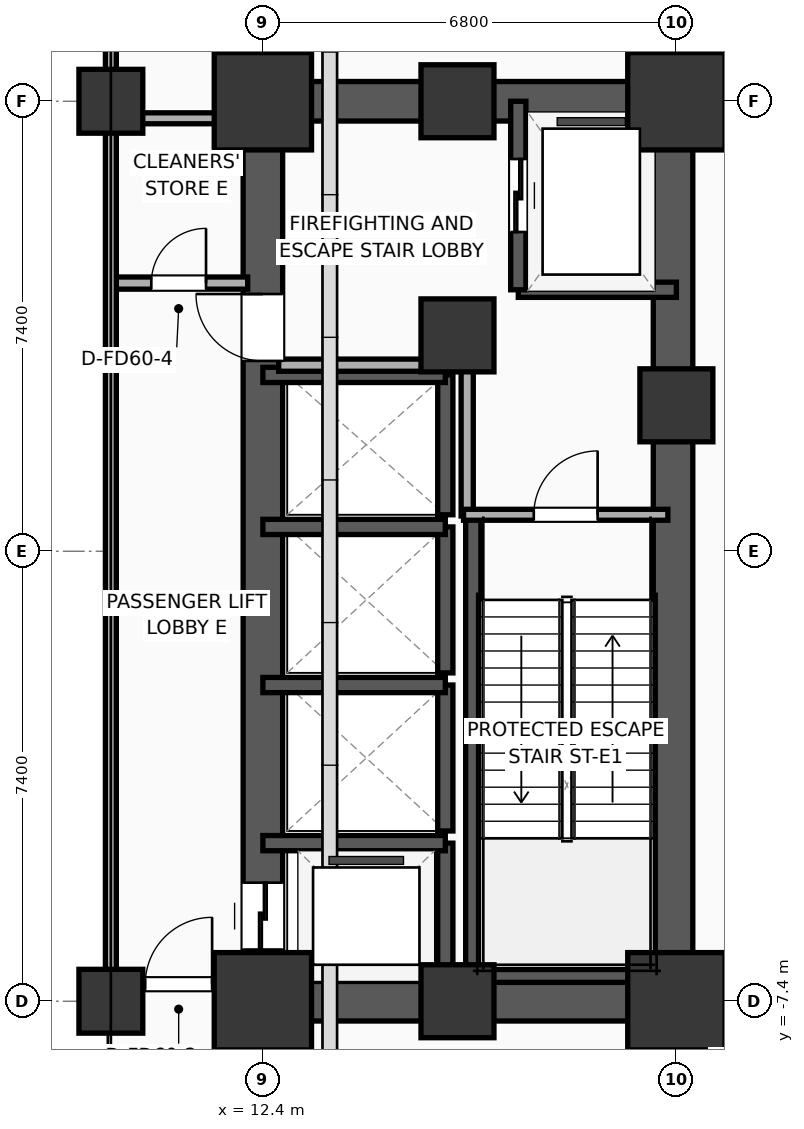
"""IFC4 building model, lengths in metres.
Left out: names, types, materials, properties, quantities, classifications, styles, units other than length and angle.
Written with IfcOpenShell. Run it as: python <this file> out.ifc"""

import sys

from ifc_helpers import new_model, si_unit, direction, frame, frame_2d, origin, origin_2d, place, context, subcontext, project, spatial, rectangle, extrude, element, fill, save


model = new_model("IFC4")
c1 = context("Model", 3, precision=1e-05, world=origin(), true_north=direction((0.0, 1.0)))
c2 = subcontext(c1, "Body", "Model", "MODEL_VIEW")
j1 = project(units=[si_unit("LENGTHUNIT", "METRE"), si_unit("PLANEANGLEUNIT", "RADIAN")], contexts=[c1])
p1 = place(None, origin())
s1 = spatial("IfcSite", under=j1, at=p1, CompositionType="ELEMENT")
p2 = place(p1, origin())
s2 = spatial("IfcBuilding", under=s1, at=p2, CompositionType="ELEMENT")
p3 = place(p2, frame((0.0, 0.0, 10.4)))
s3 = spatial("IfcBuildingStorey", under=s2, at=p3, CompositionType="ELEMENT", Elevation=10.4)
p4 = place(p3, frame((12.4, -7.4, 0.0), z_axis=(0.0, 0.0, 1.0), x_axis=(1.0, 0.0, 0.0)))
e1 = element("IfcColumn", 1, at=p4, inside=s3, PredefinedType="COLUMN", context=c2, shape_type="SweptSolid", body=[
    extrude(rectangle(XDim=1.6, YDim=1.6, at=origin_2d()), origin(), (0.0, 0.0, 1.0), 5.2),
])
p5 = place(p3, frame((15.6, 3.55, 0.0), z_axis=(0.0, 0.0, 1.0), x_axis=(1.0, 0.0, 0.0)))
e2 = element("IfcColumn", 2, at=p5, inside=s3, PredefinedType="COLUMN", context=c2, shape_type="SweptSolid", body=[
    extrude(rectangle(XDim=1.2, YDim=1.2, at=origin_2d()), origin(), (0.0, 0.0, 1.0), 5.2),
])
p6 = place(p3, frame((12.4, 7.4, 0.0), z_axis=(0.0, 0.0, 1.0), x_axis=(1.0, 0.0, 0.0)))
e3 = element("IfcColumn", 3, at=p6, inside=s3, PredefinedType="COLUMN", context=c2, shape_type="SweptSolid", body=[
    extrude(rectangle(XDim=1.6, YDim=1.6, at=origin_2d()), origin(), (0.0, 0.0, 1.0), 5.2),
])
for number, where, z_axis, x_axis in (
    (4, (15.6, -7.4, 0.0), (0.0, 0.0, 1.0), (1.0, 0.0, 0.0)),
    (5, (15.6, 7.4, 0.0), (0.0, 0.0, 1.0), (1.0, 0.0, 0.0)),
):
    element("IfcColumn", number, at=place(p3, frame(where, z_axis=z_axis, x_axis=x_axis)), inside=s3, PredefinedType="COLUMN", context=c2, shape_type="SweptSolid", body=[
        extrude(rectangle(XDim=1.2, YDim=1.2, at=origin_2d()), origin(), (0.0, 0.0, 1.0), 5.2),
    ])
p7 = place(p3, frame((19.2, -7.4, 0.0), z_axis=(0.0, 0.0, 1.0), x_axis=(1.0, 0.0, 0.0)))
e6 = element("IfcColumn", 6, at=p7, inside=s3, PredefinedType="COLUMN", context=c2, shape_type="SweptSolid", body=[
    extrude(rectangle(XDim=1.6, YDim=1.6, at=origin_2d()), origin(), (0.0, 0.0, 1.0), 5.2),
])
p8 = place(p3, frame((19.2, 2.4, 0.0), z_axis=(0.0, 0.0, 1.0), x_axis=(1.0, 0.0, 0.0)))
e7 = element("IfcColumn", 7, at=p8, inside=s3, PredefinedType="COLUMN", context=c2, shape_type="SweptSolid", body=[
    extrude(rectangle(XDim=1.2, YDim=1.2, at=origin_2d()), origin(), (0.0, 0.0, 1.0), 5.2),
])
p9 = place(p3, frame((19.2, 7.4, 0.0), z_axis=(0.0, 0.0, 1.0), x_axis=(1.0, 0.0, 0.0)))
e8 = element("IfcColumn", 8, at=p9, inside=s3, PredefinedType="COLUMN", context=c2, shape_type="SweptSolid", body=[
    extrude(rectangle(XDim=1.6, YDim=1.6, at=origin_2d()), origin(), (0.0, 0.0, 1.0), 5.2),
])
for number, where, z_axis, x_axis in (
    (9, (12.075, -7.4, 0.0), (0.0, 0.0, 1.0), (1.0, 0.0, 0.0)),
    (10, (12.075, 7.4, 0.0), (0.0, 0.0, 1.0), (1.0, 0.0, 0.0)),
):
    element("IfcWall", number, at=place(p3, frame(where, z_axis=z_axis, x_axis=x_axis)), inside=s3, PredefinedType="SHEAR", context=c2, shape_type="SweptSolid", body=[
        extrude(rectangle(XDim=7.45, YDim=0.65, at=frame_2d((3.725, 0.0))), origin(), (0.0, 0.0, 1.0), 4.92),
    ])
p10 = place(p3, frame((12.4, -7.4, 0.0), z_axis=(0.0, 0.0, 1.0), x_axis=(0.0, 1.0, 0.0)))
e11 = element("IfcWall", 11, at=p10, inside=s3, PredefinedType="SHEAR", context=c2, shape_type="SweptSolid", body=[
    extrude(rectangle(XDim=14.8, YDim=0.65, at=frame_2d((7.4, 0.0))), origin(), (0.0, 0.0, 1.0), 4.92),
])
p11 = place(p10, frame((0.85, 0.0, 0.0)))
e12 = element("IfcOpeningElement", 12, at=p11, cuts=e11, PredefinedType="OPENING", context=c2, shape_type="SweptSolid", body=[
    extrude(rectangle(XDim=1.1, YDim=2.05, at=frame_2d((0.55, 1.025))), frame((0.0, 0.335, 0.0), z_axis=(0.0, -1.0, 0.0), x_axis=(1.0, 0.0, 0.0)), (0.0, 0.0, 1.0), 0.67),
])
p12 = place(p10, frame((10.53, 0.0, 0.0)))
e13 = element("IfcOpeningElement", 13, at=p12, cuts=e11, PredefinedType="OPENING", context=c2, shape_type="SweptSolid", body=[
    extrude(rectangle(XDim=1.1, YDim=2.05, at=frame_2d((0.55, 1.025))), frame((0.0, 0.335, 0.0), z_axis=(0.0, -1.0, 0.0), x_axis=(1.0, 0.0, 0.0)), (0.0, 0.0, 1.0), 0.67),
])
p13 = place(p3, frame((19.145, -7.4, 0.0), z_axis=(0.0, 0.0, 1.0), x_axis=(0.0, 1.0, 0.0)))
e14 = element("IfcWall", 14, at=p13, inside=s3, PredefinedType="SHEAR", context=c2, shape_type="SweptSolid", body=[
    extrude(rectangle(XDim=14.8, YDim=0.65, at=frame_2d((7.4, 0.0))), origin(), (0.0, 0.0, 1.0), 4.92),
])
p14 = place(p3, frame((15.86, -7.085, 0.0), z_axis=(0.0, 0.0, 1.0), x_axis=(0.0, 1.0, 0.0)))
e15 = element("IfcWall", 15, at=p14, inside=s3, PredefinedType="SOLIDWALL", context=c2, shape_type="SweptSolid", body=[
    extrude(rectangle(XDim=7.685, YDim=0.25, at=frame_2d((3.843, 0.0))), origin(), (0.0, 0.0, 1.0), 4.92),
])
p15 = place(p3, frame((15.74, -6.965, 0.0), z_axis=(0.0, 0.0, 1.0), x_axis=(1.0, 0.0, 0.0)))
e16 = element("IfcWall", 16, at=p15, inside=s3, PredefinedType="SOLIDWALL", context=c2, shape_type="SweptSolid", body=[
    extrude(rectangle(XDim=3.46, YDim=0.25, at=frame_2d((1.73, 0.0))), origin(), (0.0, 0.0, 1.0), 4.92),
])
for number, where, z_axis, x_axis in (
    (17, (9.9, -7.4, 0.0), (0.0, 0.0, 1.0), (1.0, 0.0, 0.0)),
    (18, (9.9, 7.4, 0.0), (0.0, 0.0, 1.0), (1.0, 0.0, 0.0)),
):
    element("IfcColumn", number, at=place(p3, frame(where, z_axis=z_axis, x_axis=x_axis)), inside=s3, PredefinedType="COLUMN", context=c2, shape_type="SweptSolid", body=[
        extrude(rectangle(XDim=1.05, YDim=1.05, at=origin_2d()), origin(), (0.0, 0.0, 1.0), 5.2),
    ])
p16 = place(p3, frame((16.6, 4.3, 0.0), z_axis=(0.0, 0.0, 1.0), x_axis=(1.0, 0.0, 0.0)))
e19 = element("IfcWall", 19, at=p16, inside=s3, PredefinedType="SOLIDWALL", context=c2, shape_type="SweptSolid", body=[
    extrude(rectangle(XDim=2.6, YDim=0.25, at=frame_2d((1.3, 0.0))), origin(), (0.0, 0.0, 1.0), 4.92),
])
p17 = place(p3, frame((16.6, 7.4, 0.0), z_axis=(0.0, 0.0, 1.0), x_axis=(0.0, -1.0, 0.0)))
e20 = element("IfcWall", 20, at=p17, inside=s3, PredefinedType="SOLIDWALL", context=c2, shape_type="SweptSolid", body=[
    extrude(rectangle(XDim=3.1, YDim=0.25, at=frame_2d((1.55, 0.0))), origin(), (0.0, 0.0, 1.0), 4.92),
])
p18 = place(p17, frame((0.95, 0.0, 0.0)))
e21 = element("IfcOpeningElement", 21, at=p18, cuts=e20, PredefinedType="OPENING", context=c2, shape_type="SweptSolid", body=[
    extrude(rectangle(XDim=1.2, YDim=2.05, at=frame_2d((0.6, 1.025))), frame((0.0, 0.135, 0.0), z_axis=(0.0, -1.0, 0.0), x_axis=(1.0, 0.0, 0.0)), (0.0, 0.0, 1.0), 0.27),
])
p19 = place(p3, frame((15.4, -7.4, 0.0), z_axis=(0.0, 0.0, 1.0), x_axis=(0.0, 1.0, 0.0)))
e22 = element("IfcWall", 22, at=p19, inside=s3, PredefinedType="SOLIDWALL", context=c2, shape_type="SweptSolid", body=[
    extrude(rectangle(XDim=2.6, YDim=0.25, at=frame_2d((1.3, 0.0))), origin(), (0.0, 0.0, 1.0), 4.92),
])
p20 = place(p3, frame((15.4, -4.8, 0.0), z_axis=(0.0, 0.0, 1.0), x_axis=(-1.0, 0.0, 0.0)))
e23 = element("IfcWall", 23, at=p20, inside=s3, PredefinedType="SOLIDWALL", context=c2, shape_type="SweptSolid", body=[
    extrude(rectangle(XDim=3.0, YDim=0.25, at=frame_2d((1.5, 0.0))), origin(), (0.0, 0.0, 1.0), 4.92),
])
p21 = place(p3, frame((15.4, -4.6, 0.0), z_axis=(0.0, 0.0, 1.0), x_axis=(0.0, 1.0, 0.0)))
e24 = element("IfcWall", 24, at=p21, inside=s3, PredefinedType="SOLIDWALL", context=c2, shape_type="SweptSolid", body=[
    extrude(rectangle(XDim=2.4, YDim=0.25, at=frame_2d((1.2, 0.0))), origin(), (0.0, 0.0, 1.0), 4.92),
])
p22 = place(p3, frame((15.4, -2.2, 0.0), z_axis=(0.0, 0.0, 1.0), x_axis=(-1.0, 0.0, 0.0)))
e25 = element("IfcWall", 25, at=p22, inside=s3, PredefinedType="SOLIDWALL", context=c2, shape_type="SweptSolid", body=[
    extrude(rectangle(XDim=3.0, YDim=0.25, at=frame_2d((1.5, 0.0))), origin(), (0.0, 0.0, 1.0), 4.92),
])
p23 = place(p3, frame((15.4, -2.0, 0.0), z_axis=(0.0, 0.0, 1.0), x_axis=(0.0, 1.0, 0.0)))
e26 = element("IfcWall", 26, at=p23, inside=s3, PredefinedType="SOLIDWALL", context=c2, shape_type="SweptSolid", body=[
    extrude(rectangle(XDim=2.4, YDim=0.25, at=frame_2d((1.2, 0.0))), origin(), (0.0, 0.0, 1.0), 4.92),
])
p24 = place(p3, frame((15.4, 0.4, 0.0), z_axis=(0.0, 0.0, 1.0), x_axis=(-1.0, 0.0, 0.0)))
e27 = element("IfcWall", 27, at=p24, inside=s3, PredefinedType="SOLIDWALL", context=c2, shape_type="SweptSolid", body=[
    extrude(rectangle(XDim=3.0, YDim=0.25, at=frame_2d((1.5, 0.0))), origin(), (0.0, 0.0, 1.0), 4.92),
])
p25 = place(p3, frame((15.4, 0.6, 0.0), z_axis=(0.0, 0.0, 1.0), x_axis=(0.0, 1.0, 0.0)))
e28 = element("IfcWall", 28, at=p25, inside=s3, PredefinedType="SOLIDWALL", context=c2, shape_type="SweptSolid", body=[
    extrude(rectangle(XDim=2.3, YDim=0.25, at=frame_2d((1.15, 0.0))), origin(), (0.0, 0.0, 1.0), 4.92),
])
p26 = place(p3, frame((15.4, 2.9, 0.0), z_axis=(0.0, 0.0, 1.0), x_axis=(-1.0, 0.0, 0.0)))
e29 = element("IfcWall", 29, at=p26, inside=s3, PredefinedType="SOLIDWALL", context=c2, shape_type="SweptSolid", body=[
    extrude(rectangle(XDim=3.0, YDim=0.25, at=frame_2d((1.5, 0.0))), origin(), (0.0, 0.0, 1.0), 4.92),
])
p27 = place(p3, frame((15.76, 0.58, 0.0), z_axis=(0.0, 0.0, 1.0), x_axis=(0.0, 1.0, 0.0)))
e30 = element("IfcWall", 30, at=p27, inside=s3, PredefinedType="PARTITIONING", context=c2, shape_type="SweptSolid", body=[
    extrude(rectangle(XDim=2.52, YDim=0.2, at=frame_2d((1.26, 0.0))), origin(), (0.0, 0.0, 1.0), 4.92),
])
p28 = place(p3, frame((12.66, 3.06, 0.0), z_axis=(0.0, 0.0, 1.0), x_axis=(1.0, 0.0, 0.0)))
e31 = element("IfcWall", 31, at=p28, inside=s3, PredefinedType="PARTITIONING", context=c2, shape_type="SweptSolid", body=[
    extrude(rectangle(XDim=3.16, YDim=0.2, at=frame_2d((1.58, 0.0))), origin(), (0.0, 0.0, 1.0), 4.92),
])
p29 = place(p3, frame((15.7, 0.6, 0.0), z_axis=(0.0, 0.0, 1.0), x_axis=(1.0, 0.0, 0.0)))
e32 = element("IfcWall", 32, at=p29, inside=s3, PredefinedType="PARTITIONING", context=c2, shape_type="SweptSolid", body=[
    extrude(rectangle(XDim=3.36, YDim=0.18, at=frame_2d((1.68, 0.0))), origin(), (0.0, 0.0, 1.0), 4.92),
])
p30 = place(p29, frame((1.155, 0.0, 0.0)))
e33 = element("IfcOpeningElement", 33, at=p30, cuts=e32, PredefinedType="OPENING", context=c2, shape_type="SweptSolid", body=[
    extrude(rectangle(XDim=1.05, YDim=2.05, at=frame_2d((0.525, 1.025))), frame((0.0, 0.1, 0.0), z_axis=(0.0, -1.0, 0.0), x_axis=(1.0, 0.0, 0.0)), (0.0, 0.0, 1.0), 0.2),
])
p31 = place(p3, frame((9.88, 4.41, 0.0), z_axis=(0.0, 0.0, 1.0), x_axis=(1.0, 0.0, 0.0)))
e34 = element("IfcWall", 34, at=p31, inside=s3, PredefinedType="PARTITIONING", context=c2, shape_type="SweptSolid", body=[
    extrude(rectangle(XDim=2.27, YDim=0.2, at=frame_2d((1.135, 0.0))), origin(), (0.0, 0.0, 1.0), 4.92),
])
p32 = place(p31, frame((0.685, 0.0, 0.0)))
e35 = element("IfcOpeningElement", 35, at=p32, cuts=e34, PredefinedType="OPENING", context=c2, shape_type="SweptSolid", body=[
    extrude(rectangle(XDim=0.9, YDim=2.05, at=frame_2d((0.45, 1.025))), frame((0.0, 0.11, 0.0), z_axis=(0.0, -1.0, 0.0), x_axis=(1.0, 0.0, 0.0)), (0.0, 0.0, 1.0), 0.22),
])
p33 = place(p3, frame((9.88, 7.12, 0.0), z_axis=(0.0, 0.0, 1.0), x_axis=(1.0, 0.0, 0.0)))
e36 = element("IfcWall", 36, at=p33, inside=s3, PredefinedType="PARTITIONING", context=c2, shape_type="SweptSolid", body=[
    extrude(rectangle(XDim=2.27, YDim=0.18, at=frame_2d((1.135, 0.0))), origin(), (0.0, 0.0, 1.0), 4.21),
])
p34 = place(p3, frame((9.88, -7.12, 0.0), z_axis=(0.0, 0.0, 1.0), x_axis=(1.0, 0.0, 0.0)))
e37 = element("IfcWall", 37, at=p34, inside=s3, PredefinedType="PARTITIONING", context=c2, shape_type="SweptSolid", body=[
    extrude(rectangle(XDim=2.27, YDim=0.18, at=frame_2d((1.135, 0.0))), origin(), (0.0, 0.0, 1.0), 4.21),
])
p35 = place(p34, frame((0.585, 0.0, 0.0)))
e38 = element("IfcOpeningElement", 38, at=p35, cuts=e37, PredefinedType="OPENING", context=c2, shape_type="SweptSolid", body=[
    extrude(rectangle(XDim=1.1, YDim=2.05, at=frame_2d((0.55, 1.025))), frame((0.0, 0.1, 0.0), z_axis=(0.0, -1.0, 0.0), x_axis=(1.0, 0.0, 0.0)), (0.0, 0.0, 1.0), 0.2),
])
p36 = place(p3, frame((9.9, -7.12, 0.0), z_axis=(0.0, 0.0, 1.0), x_axis=(0.0, 1.0, 0.0)))
e39 = element("IfcWall", 39, at=p36, inside=s3, PredefinedType="PARTITIONING", context=c2, shape_type="SweptSolid", body=[
    extrude(rectangle(XDim=16.82, YDim=0.18, at=frame_2d((8.41, 0.0))), origin(), (0.0, 0.0, 1.0), 4.21),
])
p37 = place(p18, origin())
e40 = element("IfcDoor", 40, at=p37, inside=s3, OperationType="SLIDING_TO_LEFT", PredefinedType="DOOR", context=c2, shape_type="SweptSolid", body=[
    extrude(rectangle(XDim=1.2, YDim=2.05, at=frame_2d((0.6, 1.025))), frame((0.0, 0.025, 0.0), z_axis=(0.0, -1.0, 0.0), x_axis=(1.0, 0.0, 0.0)), (0.0, 0.0, 1.0), 0.05),
])
fill(e21, e40)
p38 = place(p11, origin())
e41 = element("IfcDoor", 41, at=p38, inside=s3, OperationType="SLIDING_TO_LEFT", PredefinedType="DOOR", context=c2, shape_type="SweptSolid", body=[
    extrude(rectangle(XDim=1.1, YDim=2.05, at=frame_2d((0.55, 1.025))), frame((0.0, 0.025, 0.0), z_axis=(0.0, -1.0, 0.0), x_axis=(1.0, 0.0, 0.0)), (0.0, 0.0, 1.0), 0.05),
])
fill(e12, e41)
p39 = place(p30, origin())
e42 = element("IfcDoor", 42, at=p39, inside=s3, OperationType="SINGLE_SWING_RIGHT", PredefinedType="DOOR", context=c2, shape_type="SweptSolid", body=[
    extrude(rectangle(XDim=1.05, YDim=2.05, at=frame_2d((0.525, 1.025))), frame((0.0, 0.025, 0.0), z_axis=(0.0, -1.0, 0.0), x_axis=(1.0, 0.0, 0.0)), (0.0, 0.0, 1.0), 0.05),
])
fill(e33, e42)
p40 = place(p32, origin())
e43 = element("IfcDoor", 43, at=p40, inside=s3, OperationType="SINGLE_SWING_RIGHT", PredefinedType="DOOR", context=c2, shape_type="SweptSolid", body=[
    extrude(rectangle(XDim=0.9, YDim=2.05, at=frame_2d((0.45, 1.025))), frame((0.0, 0.025, 0.0), z_axis=(0.0, -1.0, 0.0), x_axis=(1.0, 0.0, 0.0)), (0.0, 0.0, 1.0), 0.05),
])
fill(e35, e43)
p41 = place(p35, origin())
e44 = element("IfcDoor", 44, at=p41, inside=s3, OperationType="SINGLE_SWING_RIGHT", PredefinedType="DOOR", context=c2, shape_type="SweptSolid", body=[
    extrude(rectangle(XDim=1.1, YDim=2.05, at=frame_2d((0.55, 1.025))), frame((0.0, 0.025, 0.0), z_axis=(0.0, -1.0, 0.0), x_axis=(1.0, 0.0, 0.0)), (0.0, 0.0, 1.0), 0.05),
])
fill(e38, e44)
p42 = place(p12, origin())
e45 = element("IfcDoor", 45, at=p42, inside=s3, OperationType="SINGLE_SWING_RIGHT", PredefinedType="DOOR", context=c2, shape_type="SweptSolid", body=[
    extrude(rectangle(XDim=1.1, YDim=2.05, at=frame_2d((0.55, 1.025))), frame((0.0, 0.025, 0.0), z_axis=(0.0, -1.0, 0.0), x_axis=(1.0, 0.0, 0.0)), (0.0, 0.0, 1.0), 0.05),
])
fill(e13, e45)
save(model, sys.argv[1])
